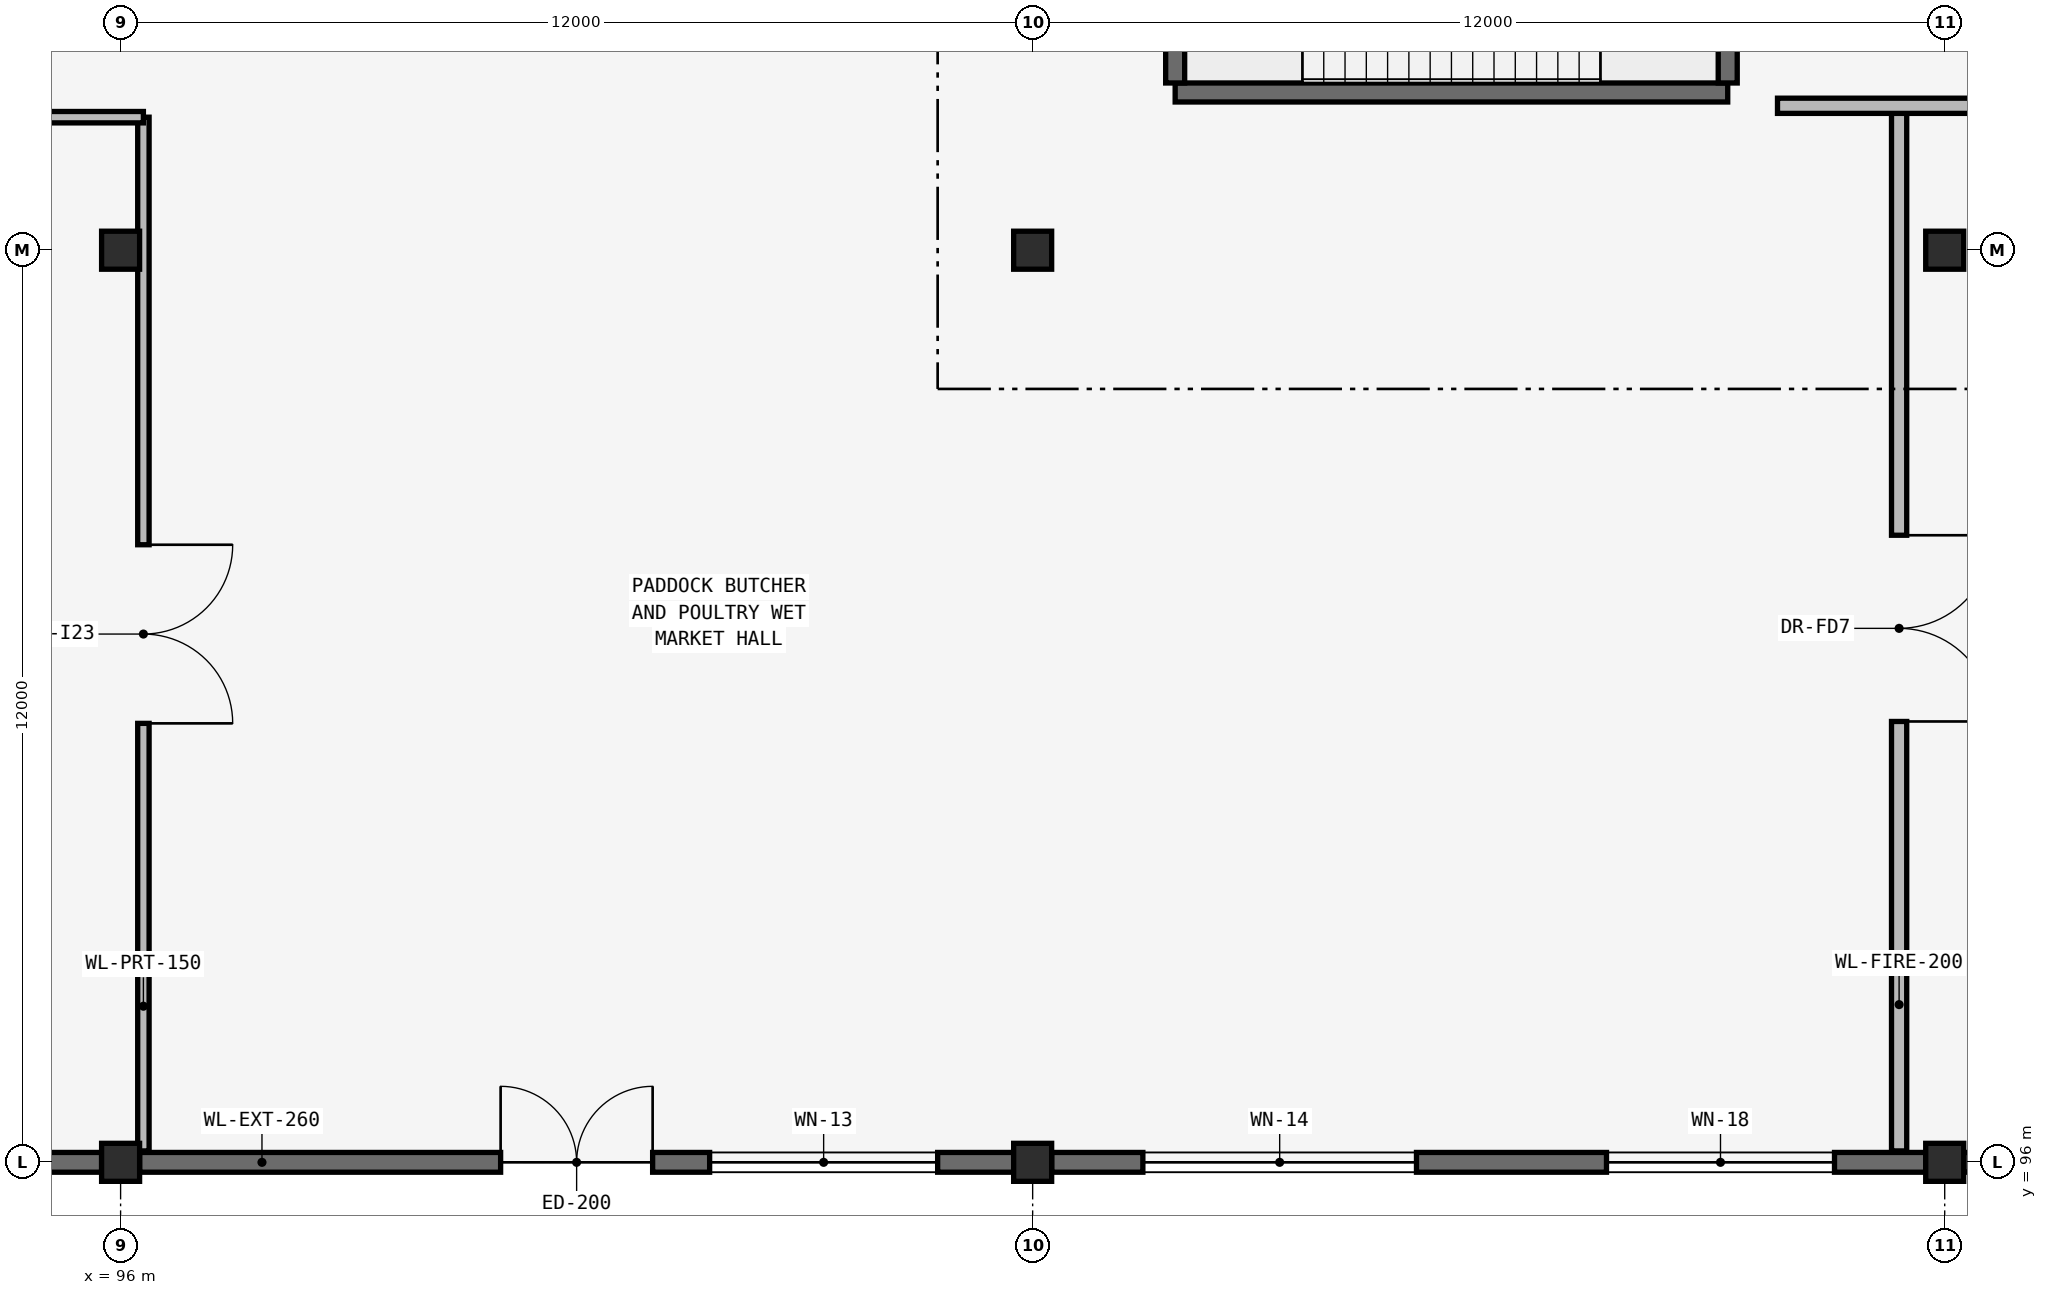
"""IFC4 building model, lengths in metres.
Left out: names, types, materials, properties, quantities, classifications, styles, units other than length and angle.
Written with IfcOpenShell. Run it as: python <this file> out.ifc"""

import sys

from ifc_helpers import new_model, si_unit, direction, frame, frame_2d, origin, origin_2d, place, context, subcontext, project, spatial, rectangle, extrude, element, fill, save


model = new_model("IFC4")
c1 = context("Model", 3, precision=1e-05, world=origin(), true_north=direction((0.0, 1.0)))
c2 = subcontext(c1, "Body", "Model", "MODEL_VIEW")
j1 = project(units=[si_unit("LENGTHUNIT", "METRE"), si_unit("PLANEANGLEUNIT", "RADIAN")], contexts=[c1])
p1 = place(None, origin())
s1 = spatial("IfcSite", under=j1, at=p1, CompositionType="ELEMENT")
p2 = place(p1, origin())
s2 = spatial("IfcBuilding", under=s1, at=p2, CompositionType="ELEMENT")
p3 = place(p2, origin())
s3 = spatial("IfcBuildingStorey", under=s2, at=p3, CompositionType="ELEMENT", Elevation=0.0)
for number, where, z_axis, x_axis in (
    (1, (96.0, 96.0, 0.0), (0.0, 0.0, 1.0), (1.0, 0.0, 0.0)),
    (2, (96.0, 108.0, 0.0), (0.0, 0.0, 1.0), (1.0, 0.0, 0.0)),
    (3, (108.0, 96.0, 0.0), (0.0, 0.0, 1.0), (1.0, 0.0, 0.0)),
    (4, (108.0, 108.0, 0.0), (0.0, 0.0, 1.0), (1.0, 0.0, 0.0)),
    (5, (120.0, 96.0, 0.0), (0.0, 0.0, 1.0), (1.0, 0.0, 0.0)),
    (6, (120.0, 108.0, 0.0), (0.0, 0.0, 1.0), (1.0, 0.0, 0.0)),
):
    element("IfcColumn", number, at=place(p3, frame(where, z_axis=z_axis, x_axis=x_axis)), inside=s3, PredefinedType="COLUMN", context=c2, shape_type="SweptSolid", body=[
        extrude(rectangle(XDim=0.5, YDim=0.5, at=origin_2d()), origin(), (0.0, 0.0, 1.0), 5.4),
    ])
p4 = place(p3, frame((84.25, 96.0, 0.0), z_axis=(0.0, 0.0, 1.0), x_axis=(1.0, 0.0, 0.0)))
e7 = element("IfcWall", 7, at=p4, inside=s3, PredefinedType="SOLIDWALL", context=c2, shape_type="SweptSolid", body=[
    extrude(rectangle(XDim=11.5, YDim=0.26, at=frame_2d((5.75, 0.0))), origin(), (0.0, 0.0, 1.0), 5.08),
])
p5 = place(p4, frame((1.2, 0.0, 0.8)))
e8 = element("IfcOpeningElement", 8, at=p5, cuts=e7, PredefinedType="OPENING", context=c2, shape_type="SweptSolid", body=[
    extrude(rectangle(XDim=3.6, YDim=2.1, at=frame_2d((1.8, 1.05))), frame((0.0, 0.145, 0.0), z_axis=(0.0, -1.0, 0.0), x_axis=(1.0, 0.0, 0.0)), (0.0, 0.0, 1.0), 0.29),
])
p6 = place(p4, frame((7.3, 0.0, 1.1)))
e9 = element("IfcOpeningElement", 9, at=p6, cuts=e7, PredefinedType="OPENING", context=c2, shape_type="SweptSolid", body=[
    extrude(rectangle(XDim=3.0, YDim=1.5, at=frame_2d((1.5, 0.75))), frame((0.0, 0.145, 0.0), z_axis=(0.0, -1.0, 0.0), x_axis=(1.0, 0.0, 0.0)), (0.0, 0.0, 1.0), 0.29),
])
p7 = place(p3, frame((96.25, 96.0, 0.0), z_axis=(0.0, 0.0, 1.0), x_axis=(1.0, 0.0, 0.0)))
e10 = element("IfcWall", 10, at=p7, inside=s3, PredefinedType="SOLIDWALL", context=c2, shape_type="SweptSolid", body=[
    extrude(rectangle(XDim=11.5, YDim=0.26, at=frame_2d((5.75, 0.0))), origin(), (0.0, 0.0, 1.0), 5.08),
])
p8 = place(p7, frame((4.75, 0.0, 0.0)))
e11 = element("IfcOpeningElement", 11, at=p8, cuts=e10, PredefinedType="OPENING", context=c2, shape_type="SweptSolid", body=[
    extrude(rectangle(XDim=2.0, YDim=2.3, at=frame_2d((1.0, 1.15))), frame((0.0, 0.145, 0.0), z_axis=(0.0, -1.0, 0.0), x_axis=(1.0, 0.0, 0.0)), (0.0, 0.0, 1.0), 0.29),
])
p9 = place(p7, frame((7.5, 0.0, 0.8)))
e12 = element("IfcOpeningElement", 12, at=p9, cuts=e10, PredefinedType="OPENING", context=c2, shape_type="SweptSolid", body=[
    extrude(rectangle(XDim=3.0, YDim=2.1, at=frame_2d((1.5, 1.05))), frame((0.0, 0.145, 0.0), z_axis=(0.0, -1.0, 0.0), x_axis=(1.0, 0.0, 0.0)), (0.0, 0.0, 1.0), 0.29),
])
p10 = place(p3, frame((108.25, 96.0, 0.0), z_axis=(0.0, 0.0, 1.0), x_axis=(1.0, 0.0, 0.0)))
e13 = element("IfcWall", 13, at=p10, inside=s3, PredefinedType="SOLIDWALL", context=c2, shape_type="SweptSolid", body=[
    extrude(rectangle(XDim=11.5, YDim=0.26, at=frame_2d((5.75, 0.0))), origin(), (0.0, 0.0, 1.0), 5.08),
])
p11 = place(p10, frame((1.2, 0.0, 0.8)))
e14 = element("IfcOpeningElement", 14, at=p11, cuts=e13, PredefinedType="OPENING", context=c2, shape_type="SweptSolid", body=[
    extrude(rectangle(XDim=3.6, YDim=2.1, at=frame_2d((1.8, 1.05))), frame((0.0, 0.145, 0.0), z_axis=(0.0, -1.0, 0.0), x_axis=(1.0, 0.0, 0.0)), (0.0, 0.0, 1.0), 0.29),
])
p12 = place(p10, frame((7.3, 0.0, 1.1)))
e15 = element("IfcOpeningElement", 15, at=p12, cuts=e13, PredefinedType="OPENING", context=c2, shape_type="SweptSolid", body=[
    extrude(rectangle(XDim=3.0, YDim=1.5, at=frame_2d((1.5, 0.75))), frame((0.0, 0.145, 0.0), z_axis=(0.0, -1.0, 0.0), x_axis=(1.0, 0.0, 0.0)), (0.0, 0.0, 1.0), 0.29),
])
p13 = place(p3, frame((120.25, 96.0, 0.0), z_axis=(0.0, 0.0, 1.0), x_axis=(1.0, 0.0, 0.0)))
e16 = element("IfcWall", 16, at=p13, inside=s3, PredefinedType="SOLIDWALL", context=c2, shape_type="SweptSolid", body=[
    extrude(rectangle(XDim=11.5, YDim=0.26, at=frame_2d((5.75, 0.0))), origin(), (0.0, 0.0, 1.0), 5.08),
])
p14 = place(p13, frame((3.85, 0.0, 0.0)))
e17 = element("IfcOpeningElement", 17, at=p14, cuts=e16, PredefinedType="OPENING", context=c2, shape_type="SweptSolid", body=[
    extrude(rectangle(XDim=3.8, YDim=3.85, at=frame_2d((1.9, 1.925))), frame((0.0, 0.145, 0.0), z_axis=(0.0, -1.0, 0.0), x_axis=(1.0, 0.0, 0.0)), (0.0, 0.0, 1.0), 0.29),
])
p15 = place(p3, frame((109.875, 110.075, 0.0), z_axis=(0.0, 0.0, 1.0), x_axis=(1.0, 0.0, 0.0)))
e18 = element("IfcWall", 18, at=p15, inside=s3, PredefinedType="SHEAR", context=c2, shape_type="SweptSolid", body=[
    extrude(rectangle(XDim=7.27, YDim=0.25, at=frame_2d((3.635, 0.0))), origin(), (0.0, 0.0, 1.0), 5.08),
])
for number, where, z_axis, x_axis in (
    (19, (109.875, 110.2, 0.0), (0.0, 0.0, 1.0), (0.0, 1.0, 0.0)),
    (20, (117.145, 110.2, 0.0), (0.0, 0.0, 1.0), (0.0, 1.0, 0.0)),
):
    element("IfcWall", number, at=place(p3, frame(where, z_axis=z_axis, x_axis=x_axis)), inside=s3, PredefinedType="SHEAR", context=c2, shape_type="SweptSolid", body=[
        extrude(rectangle(XDim=3.3, YDim=0.25, at=frame_2d((1.65, 0.0))), origin(), (0.0, 0.0, 1.0), 5.08),
    ])
p16 = place(p3, frame((96.3, 96.15, 0.0), z_axis=(0.0, 0.0, 1.0), x_axis=(0.0, 1.0, 0.0)))
e21 = element("IfcWall", 21, at=p16, inside=s3, PredefinedType="PARTITIONING", context=c2, shape_type="SweptSolid", body=[
    extrude(rectangle(XDim=13.6, YDim=0.15, at=frame_2d((6.8, 0.0))), origin(), (0.0, 0.0, 1.0), 5.08),
])
p17 = place(p16, frame((5.625, 0.0, 0.0)))
e22 = element("IfcOpeningElement", 22, at=p17, cuts=e21, PredefinedType="OPENING", context=c2, shape_type="SweptSolid", body=[
    extrude(rectangle(XDim=2.35, YDim=2.35, at=frame_2d((1.175, 1.175))), frame((0.0, 0.09, 0.0), z_axis=(0.0, -1.0, 0.0), x_axis=(1.0, 0.0, 0.0)), (0.0, 0.0, 1.0), 0.18),
])
p18 = place(p3, frame((119.4, 96.15, 0.0), z_axis=(0.0, 0.0, 1.0), x_axis=(0.0, 1.0, 0.0)))
e23 = element("IfcWall", 23, at=p18, inside=s3, PredefinedType="SOLIDWALL", context=c2, shape_type="SweptSolid", body=[
    extrude(rectangle(XDim=13.75, YDim=0.2, at=frame_2d((6.875, 0.0))), origin(), (0.0, 0.0, 1.0), 5.08),
])
p19 = place(p18, frame((5.65, 0.0, 0.0)))
e24 = element("IfcOpeningElement", 24, at=p19, cuts=e23, PredefinedType="OPENING", context=c2, shape_type="SweptSolid", body=[
    extrude(rectangle(XDim=2.45, YDim=2.4, at=frame_2d((1.225, 1.2))), frame((0.0, 0.115, 0.0), z_axis=(0.0, -1.0, 0.0), x_axis=(1.0, 0.0, 0.0)), (0.0, 0.0, 1.0), 0.23),
])
p20 = place(p3, frame((69.8, 109.75, 0.0), z_axis=(0.0, 0.0, 1.0), x_axis=(1.0, 0.0, 0.0)))
e25 = element("IfcWall", 25, at=p20, inside=s3, PredefinedType="PARTITIONING", context=c2, shape_type="SweptSolid", body=[
    extrude(rectangle(XDim=26.5, YDim=0.15, at=frame_2d((13.25, 0.0))), origin(), (0.0, 0.0, 1.0), 5.08),
])
p21 = place(p20, frame((12.525, 0.0, 0.0)))
e26 = element("IfcOpeningElement", 26, at=p21, cuts=e25, PredefinedType="OPENING", context=c2, shape_type="SweptSolid", body=[
    extrude(rectangle(XDim=1.45, YDim=2.15, at=frame_2d((0.725, 1.075))), frame((0.0, 0.09, 0.0), z_axis=(0.0, -1.0, 0.0), x_axis=(1.0, 0.0, 0.0)), (0.0, 0.0, 1.0), 0.18),
])
p22 = place(p3, frame((117.8, 109.9, 0.0), z_axis=(0.0, 0.0, 1.0), x_axis=(1.0, 0.0, 0.0)))
e27 = element("IfcWall", 27, at=p22, inside=s3, PredefinedType="SOLIDWALL", context=c2, shape_type="SweptSolid", body=[
    extrude(rectangle(XDim=26.4, YDim=0.2, at=frame_2d((13.2, 0.0))), origin(), (0.0, 0.0, 1.0), 5.08),
])
p23 = place(p22, frame((11.975, 0.0, 0.0)))
e28 = element("IfcOpeningElement", 28, at=p23, cuts=e27, PredefinedType="OPENING", context=c2, shape_type="SweptSolid", body=[
    extrude(rectangle(XDim=2.45, YDim=2.4, at=frame_2d((1.225, 1.2))), frame((0.0, 0.115, 0.0), z_axis=(0.0, -1.0, 0.0), x_axis=(1.0, 0.0, 0.0)), (0.0, 0.0, 1.0), 0.23),
])
p24 = place(p8, frame((2.0, 0.0, 0.0), z_axis=(0.0, 0.0, 1.0), x_axis=(-1.0, 0.0, 0.0)))
e29 = element("IfcDoor", 29, at=p24, inside=s3, OperationType="DOUBLE_DOOR_SINGLE_SWING", PredefinedType="DOOR", context=c2, shape_type="SweptSolid", body=[
    extrude(rectangle(XDim=2.0, YDim=2.3, at=frame_2d((1.0, 1.15))), frame((0.0, 0.025, 0.0), z_axis=(0.0, -1.0, 0.0), x_axis=(1.0, 0.0, 0.0)), (0.0, 0.0, 1.0), 0.05),
])
fill(e11, e29)
p25 = place(p9, origin())
e30 = element("IfcWindow", 30, at=p25, inside=s3, PartitioningType="SINGLE_PANEL", PredefinedType="WINDOW", context=c2, shape_type="SweptSolid", body=[
    extrude(rectangle(XDim=3.0, YDim=2.1, at=frame_2d((1.5, 1.05))), frame((0.0, 0.03, 0.0), z_axis=(0.0, -1.0, 0.0), x_axis=(1.0, 0.0, 0.0)), (0.0, 0.0, 1.0), 0.06),
])
fill(e12, e30)
p26 = place(p11, origin())
e31 = element("IfcWindow", 31, at=p26, inside=s3, PartitioningType="SINGLE_PANEL", PredefinedType="WINDOW", context=c2, shape_type="SweptSolid", body=[
    extrude(rectangle(XDim=3.6, YDim=2.1, at=frame_2d((1.8, 1.05))), frame((0.0, 0.03, 0.0), z_axis=(0.0, -1.0, 0.0), x_axis=(1.0, 0.0, 0.0)), (0.0, 0.0, 1.0), 0.06),
])
fill(e14, e31)
p27 = place(p12, origin())
e32 = element("IfcWindow", 32, at=p27, inside=s3, PartitioningType="SINGLE_PANEL", PredefinedType="WINDOW", context=c2, shape_type="SweptSolid", body=[
    extrude(rectangle(XDim=3.0, YDim=1.5, at=frame_2d((1.5, 0.75))), frame((0.0, 0.03, 0.0), z_axis=(0.0, -1.0, 0.0), x_axis=(1.0, 0.0, 0.0)), (0.0, 0.0, 1.0), 0.06),
])
fill(e15, e32)
p28 = place(p17, origin())
e33 = element("IfcDoor", 33, at=p28, inside=s3, OperationType="DOUBLE_DOOR_SINGLE_SWING", PredefinedType="DOOR", context=c2, shape_type="SweptSolid", body=[
    extrude(rectangle(XDim=2.35, YDim=2.35, at=frame_2d((1.175, 1.175))), frame((0.0, 0.025, 0.0), z_axis=(0.0, -1.0, 0.0), x_axis=(1.0, 0.0, 0.0)), (0.0, 0.0, 1.0), 0.05),
])
fill(e22, e33)
p29 = place(p19, origin())
e34 = element("IfcDoor", 34, at=p29, inside=s3, OperationType="DOUBLE_DOOR_SINGLE_SWING", PredefinedType="DOOR", context=c2, shape_type="SweptSolid", body=[
    extrude(rectangle(XDim=2.45, YDim=2.4, at=frame_2d((1.225, 1.2))), frame((0.0, 0.025, 0.0), z_axis=(0.0, -1.0, 0.0), x_axis=(1.0, 0.0, 0.0)), (0.0, 0.0, 1.0), 0.05),
])
fill(e24, e34)
save(model, sys.argv[1])
